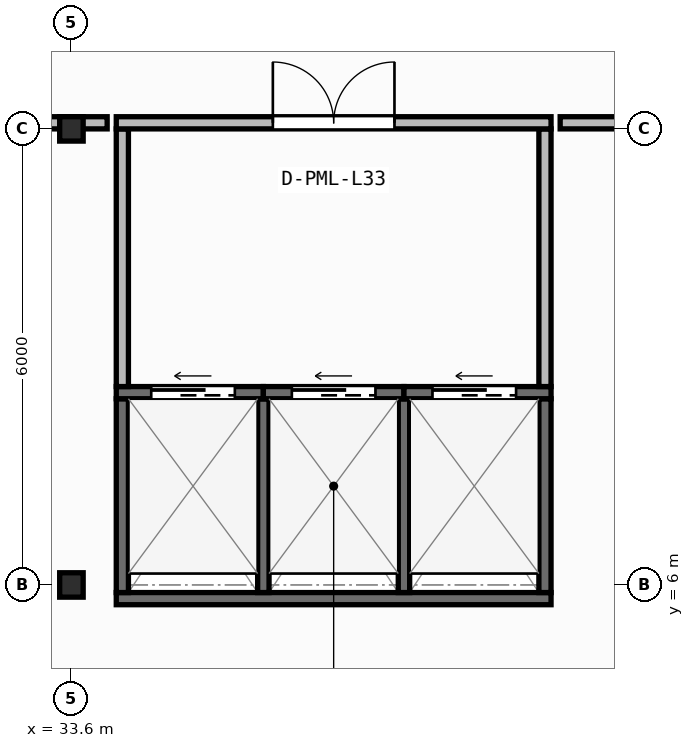
"""IFC4 building model, lengths in metres.
Left out: names, types, materials, properties, quantities, classifications, styles, units other than length and angle.
Written with IfcOpenShell. Run it as: python <this file> out.ifc"""

import sys

from ifc_helpers import new_model, si_unit, direction, frame, frame_2d, origin, origin_2d, place, context, subcontext, project, spatial, rectangle, i_section, extrude, element, fill, save


model = new_model("IFC4")
c1 = context("Model", 3, precision=1e-05, world=origin(), true_north=direction((0.0, 1.0)))
c2 = subcontext(c1, "Body", "Model", "MODEL_VIEW")
j1 = project(units=[si_unit("LENGTHUNIT", "METRE"), si_unit("PLANEANGLEUNIT", "RADIAN")], contexts=[c1])
p1 = place(None, origin())
s1 = spatial("IfcSite", under=j1, at=p1, CompositionType="ELEMENT")
p2 = place(p1, origin())
s2 = spatial("IfcBuilding", under=s1, at=p2, CompositionType="ELEMENT")
p3 = place(p2, frame((0.0, 0.0, 134.95)))
s3 = spatial("IfcBuildingStorey", under=s2, at=p3, CompositionType="ELEMENT", Elevation=134.95)
for number, where, z_axis, x_axis in (
    (1, (33.6, 6.0, 0.0), (0.0, 0.0, 1.0), (1.0, 0.0, 0.0)),
    (2, (33.6, 12.0, 0.0), (0.0, 0.0, 1.0), (1.0, 0.0, 0.0)),
):
    element("IfcColumn", number, at=place(p3, frame(where, z_axis=z_axis, x_axis=x_axis)), inside=s3, PredefinedType="COLUMN", context=c2, shape_type="SweptSolid", body=[
        extrude(i_section(OverallWidth=0.309, OverallDepth=0.321, WebThickness=0.014, FlangeThickness=0.022, FilletRadius=0.017, at=origin_2d()), origin(), (0.0, 0.0, 1.0), 3.95),
    ])
p4 = place(p3, frame((34.19, 5.82, 0.0), z_axis=(0.0, 0.0, 1.0), x_axis=(1.0, 0.0, 0.0)))
e3 = element("IfcWall", 3, at=p4, inside=s3, PredefinedType="SHEAR", context=c2, shape_type="SweptSolid", body=[
    extrude(rectangle(XDim=5.72, YDim=0.16, at=frame_2d((2.86, 0.0))), origin(), (0.0, 0.0, 1.0), 3.71),
])
for number, where, z_axis, x_axis in (
    (4, (34.27, 5.9, 0.0), (0.0, 0.0, 1.0), (0.0, 1.0, 0.0)),
    (5, (39.83, 5.9, 0.0), (0.0, 0.0, 1.0), (0.0, 1.0, 0.0)),
):
    element("IfcWall", number, at=place(p3, frame(where, z_axis=z_axis, x_axis=x_axis)), inside=s3, PredefinedType="SHEAR", context=c2, shape_type="SweptSolid", body=[
        extrude(rectangle(XDim=2.55, YDim=0.16, at=frame_2d((1.275, 0.0))), origin(), (0.0, 0.0, 1.0), 3.71),
    ])
for number, where, z_axis, x_axis in (
    (6, (36.125, 5.9, 0.0), (0.0, 0.0, 1.0), (0.0, 1.0, 0.0)),
    (7, (37.975, 5.9, 0.0), (0.0, 0.0, 1.0), (0.0, 1.0, 0.0)),
):
    element("IfcWall", number, at=place(p3, frame(where, z_axis=z_axis, x_axis=x_axis)), inside=s3, PredefinedType="SHEAR", context=c2, shape_type="SweptSolid", body=[
        extrude(rectangle(XDim=2.55, YDim=0.15, at=frame_2d((1.275, 0.0))), origin(), (0.0, 0.0, 1.0), 3.71),
    ])
p5 = place(p3, frame((34.19, 8.53, 0.0), z_axis=(0.0, 0.0, 1.0), x_axis=(1.0, 0.0, 0.0)))
e8 = element("IfcWall", 8, at=p5, inside=s3, PredefinedType="SHEAR", context=c2, shape_type="SweptSolid", body=[
    extrude(rectangle(XDim=1.935, YDim=0.16, at=frame_2d((0.968, 0.0))), origin(), (0.0, 0.0, 1.0), 3.71),
])
p6 = place(p5, frame((0.46, 0.0, 0.0)))
e9 = element("IfcOpeningElement", 9, at=p6, cuts=e8, PredefinedType="OPENING", context=c2, shape_type="SweptSolid", body=[
    extrude(rectangle(XDim=1.1, YDim=2.15, at=frame_2d((0.55, 1.075))), frame((0.0, 0.09, 0.0), z_axis=(0.0, -1.0, 0.0), x_axis=(1.0, 0.0, 0.0)), (0.0, 0.0, 1.0), 0.18),
])
p7 = place(p3, frame((36.125, 8.53, 0.0), z_axis=(0.0, 0.0, 1.0), x_axis=(1.0, 0.0, 0.0)))
e10 = element("IfcWall", 10, at=p7, inside=s3, PredefinedType="SHEAR", context=c2, shape_type="SweptSolid", body=[
    extrude(rectangle(XDim=1.85, YDim=0.16, at=frame_2d((0.925, 0.0))), origin(), (0.0, 0.0, 1.0), 3.71),
])
p8 = place(p7, frame((0.375, 0.0, 0.0)))
e11 = element("IfcOpeningElement", 11, at=p8, cuts=e10, PredefinedType="OPENING", context=c2, shape_type="SweptSolid", body=[
    extrude(rectangle(XDim=1.1, YDim=2.15, at=frame_2d((0.55, 1.075))), frame((0.0, 0.09, 0.0), z_axis=(0.0, -1.0, 0.0), x_axis=(1.0, 0.0, 0.0)), (0.0, 0.0, 1.0), 0.18),
])
p9 = place(p3, frame((37.975, 8.53, 0.0), z_axis=(0.0, 0.0, 1.0), x_axis=(1.0, 0.0, 0.0)))
e12 = element("IfcWall", 12, at=p9, inside=s3, PredefinedType="SHEAR", context=c2, shape_type="SweptSolid", body=[
    extrude(rectangle(XDim=1.935, YDim=0.16, at=frame_2d((0.967, 0.0))), origin(), (0.0, 0.0, 1.0), 3.71),
])
p10 = place(p9, frame((0.375, 0.0, 0.0)))
e13 = element("IfcOpeningElement", 13, at=p10, cuts=e12, PredefinedType="OPENING", context=c2, shape_type="SweptSolid", body=[
    extrude(rectangle(XDim=1.1, YDim=2.15, at=frame_2d((0.55, 1.075))), frame((0.0, 0.09, 0.0), z_axis=(0.0, -1.0, 0.0), x_axis=(1.0, 0.0, 0.0)), (0.0, 0.0, 1.0), 0.18),
])
for number, where, z_axis, x_axis in (
    (14, (34.27, 8.61, 0.0), (0.0, 0.0, 1.0), (0.0, 1.0, 0.0)),
    (15, (39.83, 8.61, 0.0), (0.0, 0.0, 1.0), (0.0, 1.0, 0.0)),
):
    element("IfcWall", number, at=place(p3, frame(where, z_axis=z_axis, x_axis=x_axis)), inside=s3, PredefinedType="PARTITIONING", context=c2, shape_type="SweptSolid", body=[
        extrude(rectangle(XDim=3.39, YDim=0.16, at=frame_2d((1.695, 0.0))), origin(), (0.0, 0.0, 1.0), 3.71),
    ])
p11 = place(p3, frame((34.19, 12.08, 0.0), z_axis=(0.0, 0.0, 1.0), x_axis=(1.0, 0.0, 0.0)))
e16 = element("IfcWall", 16, at=p11, inside=s3, PredefinedType="PARTITIONING", context=c2, shape_type="SweptSolid", body=[
    extrude(rectangle(XDim=5.72, YDim=0.16, at=frame_2d((2.86, 0.0))), origin(), (0.0, 0.0, 1.0), 3.083),
])
p12 = place(p11, frame((2.06, 0.0, 0.0)))
e17 = element("IfcOpeningElement", 17, at=p12, cuts=e16, PredefinedType="OPENING", context=c2, shape_type="SweptSolid", body=[
    extrude(rectangle(XDim=1.6, YDim=2.05, at=frame_2d((0.8, 1.025))), frame((0.0, 0.09, 0.0), z_axis=(0.0, -1.0, 0.0), x_axis=(1.0, 0.0, 0.0)), (0.0, 0.0, 1.0), 0.18),
])
p13 = place(p3, frame((31.439, 12.08, 0.0), z_axis=(0.0, 0.0, 1.0), x_axis=(1.0, 0.0, 0.0)))
e18 = element("IfcWall", 18, at=p13, inside=s3, PredefinedType="PARTITIONING", context=c2, shape_type="SweptSolid", body=[
    extrude(rectangle(XDim=2.631, YDim=0.16, at=frame_2d((1.315, 0.0))), origin(), (0.0, 0.0, 1.0), 3.083),
])
p14 = place(p3, frame((40.03, 12.08, 0.0), z_axis=(0.0, 0.0, 1.0), x_axis=(1.0, 0.0, 0.0)))
e19 = element("IfcWall", 19, at=p14, inside=s3, PredefinedType="PARTITIONING", context=c2, shape_type="SweptSolid", body=[
    extrude(rectangle(XDim=2.781, YDim=0.16, at=frame_2d((1.39, 0.0))), origin(), (0.0, 0.0, 1.0), 3.083),
])
p15 = place(p6, origin())
e20 = element("IfcDoor", 20, at=p15, inside=s3, OperationType="SLIDING_TO_LEFT", PredefinedType="DOOR", context=c2, shape_type="SweptSolid", body=[
    extrude(rectangle(XDim=1.1, YDim=2.15, at=frame_2d((0.55, 1.075))), frame((0.0, 0.025, 0.0), z_axis=(0.0, -1.0, 0.0), x_axis=(1.0, 0.0, 0.0)), (0.0, 0.0, 1.0), 0.05),
])
fill(e9, e20)
p16 = place(p8, origin())
e21 = element("IfcDoor", 21, at=p16, inside=s3, OperationType="SLIDING_TO_LEFT", PredefinedType="DOOR", context=c2, shape_type="SweptSolid", body=[
    extrude(rectangle(XDim=1.1, YDim=2.15, at=frame_2d((0.55, 1.075))), frame((0.0, 0.025, 0.0), z_axis=(0.0, -1.0, 0.0), x_axis=(1.0, 0.0, 0.0)), (0.0, 0.0, 1.0), 0.05),
])
fill(e11, e21)
p17 = place(p10, origin())
e22 = element("IfcDoor", 22, at=p17, inside=s3, OperationType="SLIDING_TO_LEFT", PredefinedType="DOOR", context=c2, shape_type="SweptSolid", body=[
    extrude(rectangle(XDim=1.1, YDim=2.15, at=frame_2d((0.55, 1.075))), frame((0.0, 0.025, 0.0), z_axis=(0.0, -1.0, 0.0), x_axis=(1.0, 0.0, 0.0)), (0.0, 0.0, 1.0), 0.05),
])
fill(e13, e22)
p18 = place(p12, origin())
e23 = element("IfcDoor", 23, at=p18, inside=s3, OperationType="DOUBLE_DOOR_SINGLE_SWING", PredefinedType="DOOR", context=c2, shape_type="SweptSolid", body=[
    extrude(rectangle(XDim=1.6, YDim=2.05, at=frame_2d((0.8, 1.025))), frame((0.0, 0.025, 0.0), z_axis=(0.0, -1.0, 0.0), x_axis=(1.0, 0.0, 0.0)), (0.0, 0.0, 1.0), 0.05),
])
fill(e17, e23)
save(model, sys.argv[1])
